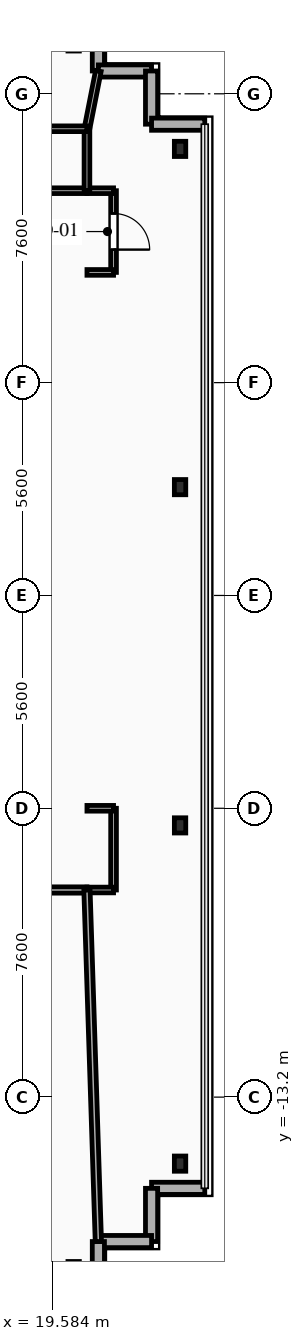
"""IFC4 building model, lengths in metres.
Left out: names, types, materials, properties, quantities, classifications, styles, units other than length and angle.
Written with IfcOpenShell. Run it as: python <this file> out.ifc"""

import sys

from ifc_helpers import new_model, si_unit, direction, frame, frame_2d, origin, origin_2d, place, context, subcontext, project, spatial, rectangle, i_section, extrude, element, fill, save


model = new_model("IFC4")
c1 = context("Model", 3, precision=1e-05, world=origin(), true_north=direction((0.0, 1.0)))
c2 = subcontext(c1, "Body", "Model", "MODEL_VIEW")
j1 = project(units=[si_unit("LENGTHUNIT", "METRE"), si_unit("PLANEANGLEUNIT", "RADIAN")], contexts=[c1])
p1 = place(None, origin())
s1 = spatial("IfcSite", under=j1, at=p1, CompositionType="ELEMENT")
p2 = place(p1, origin())
s2 = spatial("IfcBuilding", under=s1, at=p2, CompositionType="ELEMENT")
p3 = place(p2, frame((0.0, 0.0, 266.0)))
s3 = spatial("IfcBuildingStorey", under=s2, at=p3, CompositionType="ELEMENT", Elevation=266.0)
for number, where, z_axis, x_axis in (
    (1, (22.95, -14.95, 0.0), (0.0, 0.0, 1.0), (1.0, 0.0, 0.0)),
    (2, (22.95, -6.05, 0.0), (0.0, 0.0, 1.0), (1.0, 0.0, 0.0)),
    (3, (22.95, 2.85, 0.0), (0.0, 0.0, 1.0), (1.0, 0.0, 0.0)),
    (4, (22.95, 11.75, 0.0), (0.0, 0.0, 1.0), (1.0, 0.0, 0.0)),
):
    element("IfcColumn", number, at=place(p3, frame(where, z_axis=z_axis, x_axis=x_axis)), inside=s3, PredefinedType="COLUMN", context=c2, shape_type="SweptSolid", body=[
        extrude(i_section(OverallWidth=0.3, OverallDepth=0.4, WebThickness=0.013, FlangeThickness=0.024, FilletRadius=0.027, at=origin_2d()), origin(), (0.0, 0.0, 1.0), 4.2),
    ])
for number, where, z_axis, x_axis in (
    (5, (20.8, 15.2, 0.0), (0.0, 0.0, 1.0), (0.0, -1.0, 0.0)),
    (6, (20.8, 13.8, 0.0), (0.0, 0.0, 1.0), (1.0, 0.0, 0.0)),
):
    element("IfcWall", number, at=place(p3, frame(where, z_axis=z_axis, x_axis=x_axis)), inside=s3, PredefinedType="SOLIDWALL", context=c2, shape_type="SweptSolid", body=[
        extrude(rectangle(XDim=1.4, YDim=0.32, at=frame_2d((0.7, 0.0))), origin(), (0.0, 0.0, 1.0), 3.8),
    ])
for number, where, z_axis, x_axis in (
    (7, (22.2, 13.8, 0.0), (0.0, 0.0, 1.0), (0.0, -1.0, 0.0)),
    (8, (22.2, 12.4, 0.0), (0.0, 0.0, 1.0), (1.0, 0.0, 0.0)),
    (9, (23.6, -15.6, 0.0), (0.0, 0.0, 1.0), (-1.0, 0.0, 0.0)),
):
    element("IfcWall", number, at=place(p3, frame(where, z_axis=z_axis, x_axis=x_axis)), inside=s3, PredefinedType="SOLIDWALL", context=c2, shape_type="SweptSolid", body=[
        extrude(rectangle(XDim=1.4, YDim=0.32, at=frame_2d((0.7, 0.0))), origin(), (0.0, 0.0, 1.0), 3.8),
    ])
for number, where, z_axis, x_axis in (
    (10, (22.2, -15.6, 0.0), (0.0, 0.0, 1.0), (0.0, -1.0, 0.0)),
    (11, (22.2, -17.0, 0.0), (0.0, 0.0, 1.0), (-1.0, 0.0, 0.0)),
    (12, (20.8, -17.0, 0.0), (0.0, 0.0, 1.0), (0.0, -1.0, 0.0)),
):
    element("IfcWall", number, at=place(p3, frame(where, z_axis=z_axis, x_axis=x_axis)), inside=s3, PredefinedType="SOLIDWALL", context=c2, shape_type="SweptSolid", body=[
        extrude(rectangle(XDim=1.4, YDim=0.32, at=frame_2d((0.7, 0.0))), origin(), (0.0, 0.0, 1.0), 3.8),
    ])
p4 = place(p3, frame((21.2, 10.65, 0.0), z_axis=(0.0, 0.0, 1.0), x_axis=(0.0, -1.0, 0.0)))
e13 = element("IfcWall", 13, at=p4, inside=s3, PredefinedType="PARTITIONING", context=c2, shape_type="SweptSolid", body=[
    extrude(rectangle(XDim=2.15, YDim=0.15, at=frame_2d((1.075, 0.0))), origin(), (0.0, 0.0, 1.0), 3.8),
])
p5 = place(p4, frame((0.6, 0.0, 0.0)))
e14 = element("IfcOpeningElement", 14, at=p5, cuts=e13, PredefinedType="OPENING", context=c2, shape_type="SweptSolid", body=[
    extrude(rectangle(XDim=0.95, YDim=2.1, at=frame_2d((0.475, 1.05))), frame((0.0, 0.085, 0.0), z_axis=(0.0, -1.0, 0.0), x_axis=(1.0, 0.0, 0.0)), (0.0, 0.0, 1.0), 0.17),
])
for number, where, z_axis, x_axis in (
    (15, (20.5, 10.65, 0.0), (0.0, 0.0, 1.0), (1.0, 0.0, 0.0)),
    (16, (21.2, 8.5, 0.0), (0.0, 0.0, 1.0), (-1.0, 0.0, 0.0)),
):
    element("IfcWall", number, at=place(p3, frame(where, z_axis=z_axis, x_axis=x_axis)), inside=s3, PredefinedType="PARTITIONING", context=c2, shape_type="SweptSolid", body=[
        extrude(rectangle(XDim=0.7, YDim=0.15, at=frame_2d((0.35, 0.0))), origin(), (0.0, 0.0, 1.0), 3.8),
    ])
p6 = place(p3, frame((11.6, 10.65, 0.0), z_axis=(0.0, 0.0, 1.0), x_axis=(1.0, 0.0, 0.0)))
e17 = element("IfcWall", 17, at=p6, inside=s3, PredefinedType="PLUMBINGWALL", context=c2, shape_type="SweptSolid", body=[
    extrude(rectangle(XDim=8.9, YDim=0.15, at=frame_2d((4.45, 0.0))), origin(), (0.0, 0.0, 1.0), 3.8),
])
p7 = place(p6, frame((4.855, 0.0, 0.0)))
e18 = element("IfcOpeningElement", 18, at=p7, cuts=e17, PredefinedType="OPENING", context=c2, shape_type="SweptSolid", body=[
    extrude(rectangle(XDim=0.9, YDim=2.1, at=frame_2d((0.45, 1.05))), frame((0.0, 0.085, 0.0), z_axis=(0.0, -1.0, 0.0), x_axis=(1.0, 0.0, 0.0)), (0.0, 0.0, 1.0), 0.17),
])
p8 = place(p3, frame((20.5, -7.75, 0.0), z_axis=(0.0, 0.0, 1.0), x_axis=(-1.0, 0.0, 0.0)))
e19 = element("IfcWall", 19, at=p8, inside=s3, PredefinedType="PARTITIONING", context=c2, shape_type="SweptSolid", body=[
    extrude(rectangle(XDim=12.5, YDim=0.165, at=frame_2d((6.25, 0.0))), origin(), (0.0, 0.0, 1.0), 3.8),
])
p9 = place(p8, frame((5.675, 0.0, 0.0)))
e20 = element("IfcOpeningElement", 20, at=p9, cuts=e19, PredefinedType="OPENING", context=c2, shape_type="SweptSolid", body=[
    extrude(rectangle(XDim=1.15, YDim=2.15, at=frame_2d((0.575, 1.075))), frame((0.0, 0.093, 0.0), z_axis=(0.0, -1.0, 0.0), x_axis=(1.0, 0.0, 0.0)), (0.0, 0.0, 1.0), 0.185),
])
p10 = place(p3, frame((21.2, -5.6, 0.0), z_axis=(0.0, 0.0, 1.0), x_axis=(0.0, -1.0, 0.0)))
e21 = element("IfcWall", 21, at=p10, inside=s3, PredefinedType="PARTITIONING", context=c2, shape_type="SweptSolid", body=[
    extrude(rectangle(XDim=2.15, YDim=0.15, at=frame_2d((1.075, 0.0))), origin(), (0.0, 0.0, 1.0), 3.8),
])
for number, where, z_axis, x_axis in (
    (22, (20.5, -5.6, 0.0), (0.0, 0.0, 1.0), (1.0, 0.0, 0.0)),
    (23, (21.2, -7.75, 0.0), (0.0, 0.0, 1.0), (-1.0, 0.0, 0.0)),
):
    element("IfcWall", number, at=place(p3, frame(where, z_axis=z_axis, x_axis=x_axis)), inside=s3, PredefinedType="PARTITIONING", context=c2, shape_type="SweptSolid", body=[
        extrude(rectangle(XDim=0.7, YDim=0.15, at=frame_2d((0.35, 0.0))), origin(), (0.0, 0.0, 1.0), 3.8),
    ])
p11 = place(p3, frame((20.5, -7.75, 0.0), z_axis=(0.0, 0.0, 1.0), x_axis=(0.032420659042, -0.99947431226, 0.0)))
e24 = element("IfcWall", 24, at=p11, inside=s3, PredefinedType="PARTITIONING", context=c2, shape_type="SweptSolid", body=[
    extrude(rectangle(XDim=9.255, YDim=0.165, at=frame_2d((4.627, 0.0))), origin(), (0.0, 0.0, 1.0), 3.8),
])
p12 = place(p3, frame((20.5, 10.65, 0.0), z_axis=(0.0, 0.0, 1.0), x_axis=(0.0, 1.0, 0.0)))
e25 = element("IfcWall", 25, at=p12, inside=s3, PredefinedType="PLUMBINGWALL", context=c2, shape_type="SweptSolid", body=[
    extrude(rectangle(XDim=1.63, YDim=0.15, at=frame_2d((0.815, 0.0))), origin(), (0.0, 0.0, 1.0), 3.8),
])
p13 = place(p3, frame((20.5, 12.28, 0.0), z_axis=(0.0, 0.0, 1.0), x_axis=(0.193660970649, 0.981068513636, 0.0)))
e26 = element("IfcWall", 26, at=p13, inside=s3, PredefinedType="PARTITIONING", context=c2, shape_type="SweptSolid", body=[
    extrude(rectangle(XDim=1.549, YDim=0.15, at=frame_2d((0.775, 0.0))), origin(), (0.0, 0.0, 1.0), 3.8),
])
p14 = place(p3, frame((11.6, 12.28, 0.0), z_axis=(0.0, 0.0, 1.0), x_axis=(1.0, 0.0, 0.0)))
e27 = element("IfcWall", 27, at=p14, inside=s3, PredefinedType="PLUMBINGWALL", context=c2, shape_type="SweptSolid", body=[
    extrude(rectangle(XDim=8.9, YDim=0.15, at=frame_2d((4.45, 0.0))), origin(), (0.0, 0.0, 1.0), 3.8),
])
p15 = place(p5, origin())
e28 = element("IfcDoor", 28, at=p15, inside=s3, OperationType="SINGLE_SWING_RIGHT", PredefinedType="DOOR", context=c2, shape_type="SweptSolid", body=[
    extrude(rectangle(XDim=0.95, YDim=2.1, at=frame_2d((0.475, 1.05))), frame((0.0, 0.025, 0.0), z_axis=(0.0, -1.0, 0.0), x_axis=(1.0, 0.0, 0.0)), (0.0, 0.0, 1.0), 0.05),
])
fill(e14, e28)
save(model, sys.argv[1])
